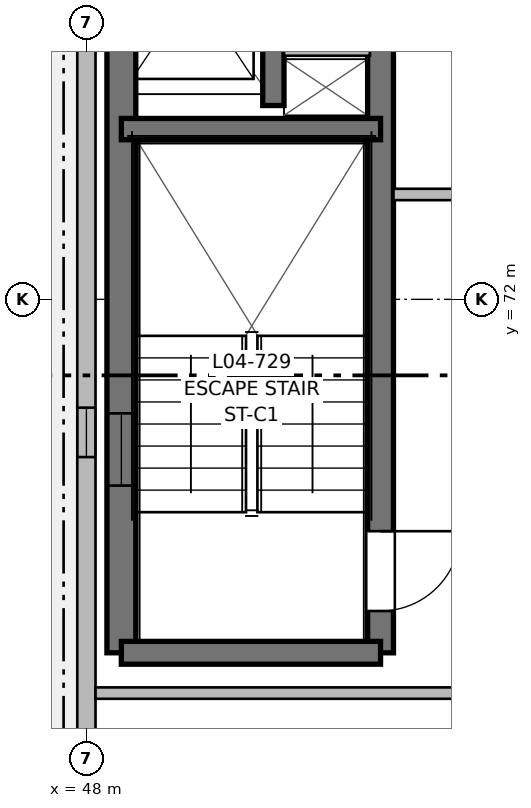
"""IFC4 building model, lengths in metres.
Left out: names, types, materials, properties, quantities, classifications, styles, units other than length and angle.
Written with IfcOpenShell. Run it as: python <this file> out.ifc"""

import sys

from ifc_helpers import new_model, si_unit, direction, frame, frame_2d, origin, place, context, subcontext, project, spatial, rectangle, extrude, element, fill, save


model = new_model("IFC4")
c1 = context("Model", 3, precision=1e-05, world=origin(), true_north=direction((0.0, 1.0)))
c2 = subcontext(c1, "Body", "Model", "MODEL_VIEW")
j1 = project(units=[si_unit("LENGTHUNIT", "METRE"), si_unit("PLANEANGLEUNIT", "RADIAN")], contexts=[c1])
p1 = place(None, origin())
s1 = spatial("IfcSite", under=j1, at=p1, CompositionType="ELEMENT")
p2 = place(p1, origin())
s2 = spatial("IfcBuilding", under=s1, at=p2, CompositionType="ELEMENT")
p3 = place(p2, frame((0.0, 0.0, 13.76)))
s3 = spatial("IfcBuildingStorey", under=s2, at=p3, CompositionType="ELEMENT", Elevation=13.76)
p4 = place(p3, frame((48.46, 67.35, 0.0), z_axis=(0.0, 0.0, 1.0), x_axis=(0.0, 1.0, 0.0)))
e1 = element("IfcWall", 1, at=p4, inside=s3, PredefinedType="SHEAR", context=c2, shape_type="SweptSolid", body=[
    extrude(rectangle(XDim=12.45, YDim=0.38, at=frame_2d((6.225, 0.0))), origin(), (0.0, 0.0, 1.0), 3.2),
])
p5 = place(p4, frame((2.2, 0.0, 0.97)))
e2 = element("IfcOpeningElement", 2, at=p5, cuts=e1, PredefinedType="OPENING", context=c2, shape_type="SweptSolid", body=[
    extrude(rectangle(XDim=0.95, YDim=1.25, at=frame_2d((0.475, 0.625))), frame((0.0, 0.2, 0.0), z_axis=(0.0, -1.0, 0.0), x_axis=(1.0, 0.0, 0.0)), (0.0, 0.0, 1.0), 0.4),
])
p6 = place(p3, frame((51.87, 79.8, 0.0), z_axis=(0.0, 0.0, 1.0), x_axis=(0.0, -1.0, 0.0)))
e3 = element("IfcWall", 3, at=p6, inside=s3, PredefinedType="SHEAR", context=c2, shape_type="SweptSolid", body=[
    extrude(rectangle(XDim=12.45, YDim=0.34, at=frame_2d((6.225, 0.0))), origin(), (0.0, 0.0, 1.0), 3.2),
])
p7 = place(p6, frame((10.85, 0.0, 0.0)))
e4 = element("IfcOpeningElement", 4, at=p7, cuts=e3, PredefinedType="OPENING", context=c2, shape_type="SweptSolid", body=[
    extrude(rectangle(XDim=1.05, YDim=2.15, at=frame_2d((0.525, 1.075))), frame((0.0, 0.18, 0.0), z_axis=(0.0, -1.0, 0.0), x_axis=(1.0, 0.0, 0.0)), (0.0, 0.0, 1.0), 0.36),
])
p8 = place(p3, frame((51.87, 67.35, 0.0), z_axis=(0.0, 0.0, 1.0), x_axis=(-1.0, 0.0, 0.0)))
e5 = element("IfcWall", 5, at=p8, inside=s3, PredefinedType="SHEAR", context=c2, shape_type="SweptSolid", body=[
    extrude(rectangle(XDim=3.41, YDim=0.3, at=frame_2d((1.705, 0.0))), origin(), (0.0, 0.0, 1.0), 3.2),
])
p9 = place(p3, frame((48.46, 74.24, 0.0), z_axis=(0.0, 0.0, 1.0), x_axis=(1.0, 0.0, 0.0)))
e6 = element("IfcWall", 6, at=p9, inside=s3, PredefinedType="SHEAR", context=c2, shape_type="SweptSolid", body=[
    extrude(rectangle(XDim=3.41, YDim=0.28, at=frame_2d((1.705, 0.0))), origin(), (0.0, 0.0, 1.0), 3.2),
])
p10 = place(p3, frame((50.46, 74.55, 0.0), z_axis=(0.0, 0.0, 1.0), x_axis=(0.0, 1.0, 0.0)))
e7 = element("IfcWall", 7, at=p10, inside=s3, PredefinedType="SHEAR", context=c2, shape_type="SweptSolid", body=[
    extrude(rectangle(XDim=5.25, YDim=0.28, at=frame_2d((2.625, 0.0))), origin(), (0.0, 0.0, 1.0), 3.2),
])
p11 = place(p10, frame((1.15, 0.0, 0.0)))
e8 = element("IfcOpeningElement", 8, at=p11, cuts=e7, PredefinedType="OPENING", context=c2, shape_type="SweptSolid", body=[
    extrude(rectangle(XDim=1.0, YDim=2.15, at=frame_2d((0.5, 1.075))), frame((0.0, 0.15, 0.0), z_axis=(0.0, -1.0, 0.0), x_axis=(1.0, 0.0, 0.0)), (0.0, 0.0, 1.0), 0.3),
])
p12 = place(p10, frame((3.85, 0.0, 0.0)))
e9 = element("IfcOpeningElement", 9, at=p12, cuts=e7, PredefinedType="OPENING", context=c2, shape_type="SweptSolid", body=[
    extrude(rectangle(XDim=0.9, YDim=2.15, at=frame_2d((0.45, 1.075))), frame((0.0, 0.15, 0.0), z_axis=(0.0, -1.0, 0.0), x_axis=(1.0, 0.0, 0.0)), (0.0, 0.0, 1.0), 0.3),
])
p13 = place(p3, frame((50.6, 75.28, 0.0), z_axis=(0.0, 0.0, 1.0), x_axis=(1.0, 0.0, 0.0)))
e10 = element("IfcWall", 10, at=p13, inside=s3, PredefinedType="PARTITIONING", context=c2, shape_type="SweptSolid", body=[
    extrude(rectangle(XDim=1.13, YDim=0.15, at=frame_2d((0.565, 0.0))), origin(), (0.0, 0.0, 1.0), 2.95),
])
p14 = place(p3, frame((48.0, 56.0, 0.0), z_axis=(0.0, 0.0, 1.0), x_axis=(0.0, 1.0, 0.0)))
e11 = element("IfcWall", 11, at=p14, inside=s3, PredefinedType="SOLIDWALL", context=c2, shape_type="SweptSolid", body=[
    extrude(rectangle(XDim=38.0, YDim=0.24, at=frame_2d((19.0, 0.0))), origin(), (0.0, 0.0, 1.0), 2.98),
])
p15 = place(p14, frame((4.15, 0.0, 0.0)))
e12 = element("IfcOpeningElement", 12, at=p15, cuts=e11, PredefinedType="OPENING", context=c2, shape_type="SweptSolid", body=[
    extrude(rectangle(XDim=1.2, YDim=2.2, at=frame_2d((0.6, 1.1))), frame((0.0, 0.13, 0.0), z_axis=(0.0, -1.0, 0.0), x_axis=(1.0, 0.0, 0.0)), (0.0, 0.0, 1.0), 0.26),
])
p16 = place(p14, frame((6.05, 0.0, 0.77)))
e13 = element("IfcOpeningElement", 13, at=p16, cuts=e11, PredefinedType="OPENING", context=c2, shape_type="SweptSolid", body=[
    extrude(rectangle(XDim=1.45, YDim=1.45, at=frame_2d((0.725, 0.725))), frame((0.0, 0.13, 0.0), z_axis=(0.0, -1.0, 0.0), x_axis=(1.0, 0.0, 0.0)), (0.0, 0.0, 1.0), 0.26),
])
p17 = place(p14, frame((13.925, 0.0, 0.9)))
e14 = element("IfcOpeningElement", 14, at=p17, cuts=e11, PredefinedType="OPENING", context=c2, shape_type="SweptSolid", body=[
    extrude(rectangle(XDim=0.65, YDim=0.95, at=frame_2d((0.325, 0.475))), frame((0.0, 0.13, 0.0), z_axis=(0.0, -1.0, 0.0), x_axis=(1.0, 0.0, 0.0)), (0.0, 0.0, 1.0), 0.26),
])
p18 = place(p14, frame((24.05, 0.0, 0.62)))
e15 = element("IfcOpeningElement", 15, at=p18, cuts=e11, PredefinedType="OPENING", context=c2, shape_type="SweptSolid", body=[
    extrude(rectangle(XDim=1.1, YDim=1.6, at=frame_2d((0.55, 0.8))), frame((0.0, 0.13, 0.0), z_axis=(0.0, -1.0, 0.0), x_axis=(1.0, 0.0, 0.0)), (0.0, 0.0, 1.0), 0.26),
])
p19 = place(p14, frame((31.9, 0.0, 0.47)))
e16 = element("IfcOpeningElement", 16, at=p19, cuts=e11, PredefinedType="OPENING", context=c2, shape_type="SweptSolid", body=[
    extrude(rectangle(XDim=2.7, YDim=1.75, at=frame_2d((1.35, 0.875))), frame((0.0, 0.13, 0.0), z_axis=(0.0, -1.0, 0.0), x_axis=(1.0, 0.0, 0.0)), (0.0, 0.0, 1.0), 0.26),
])
p20 = place(p3, frame((48.12, 66.82, 0.0), z_axis=(0.0, 0.0, 1.0), x_axis=(1.0, 0.0, 0.0)))
e17 = element("IfcWall", 17, at=p20, inside=s3, PredefinedType="PARTITIONING", context=c2, shape_type="SweptSolid", body=[
    extrude(rectangle(XDim=6.6, YDim=0.15, at=frame_2d((3.3, 0.0))), origin(), (0.0, 0.0, 1.0), 2.935),
])
p21 = place(p3, frame((52.04, 73.38, 0.0), z_axis=(0.0, 0.0, 1.0), x_axis=(1.0, 0.0, 0.0)))
e18 = element("IfcWall", 18, at=p21, inside=s3, PredefinedType="PARTITIONING", context=c2, shape_type="SweptSolid", body=[
    extrude(rectangle(XDim=2.68, YDim=0.15, at=frame_2d((1.34, 0.0))), origin(), (0.0, 0.0, 1.0), 2.935),
])
p22 = place(p7, origin())
e19 = element("IfcDoor", 19, at=p22, inside=s3, OperationType="SINGLE_SWING_LEFT", PredefinedType="DOOR", context=c2, shape_type="SweptSolid", body=[
    extrude(rectangle(XDim=1.05, YDim=2.15, at=frame_2d((0.525, 1.075))), frame((0.0, 0.025, 0.0), z_axis=(0.0, -1.0, 0.0), x_axis=(1.0, 0.0, 0.0)), (0.0, 0.0, 1.0), 0.05),
])
fill(e4, e19)
p23 = place(p5, origin())
e20 = element("IfcWindow", 20, at=p23, inside=s3, PartitioningType="SINGLE_PANEL", PredefinedType="WINDOW", context=c2, shape_type="SweptSolid", body=[
    extrude(rectangle(XDim=0.95, YDim=1.25, at=frame_2d((0.475, 0.625))), frame((0.0, 0.03, 0.0), z_axis=(0.0, -1.0, 0.0), x_axis=(1.0, 0.0, 0.0)), (0.0, 0.0, 1.0), 0.06),
])
fill(e2, e20)
p24 = place(p17, origin())
e21 = element("IfcWindow", 21, at=p24, inside=s3, PartitioningType="SINGLE_PANEL", PredefinedType="WINDOW", context=c2, shape_type="SweptSolid", body=[
    extrude(rectangle(XDim=0.65, YDim=0.95, at=frame_2d((0.325, 0.475))), frame((0.0, 0.03, 0.0), z_axis=(0.0, -1.0, 0.0), x_axis=(1.0, 0.0, 0.0)), (0.0, 0.0, 1.0), 0.06),
])
fill(e14, e21)
save(model, sys.argv[1])
